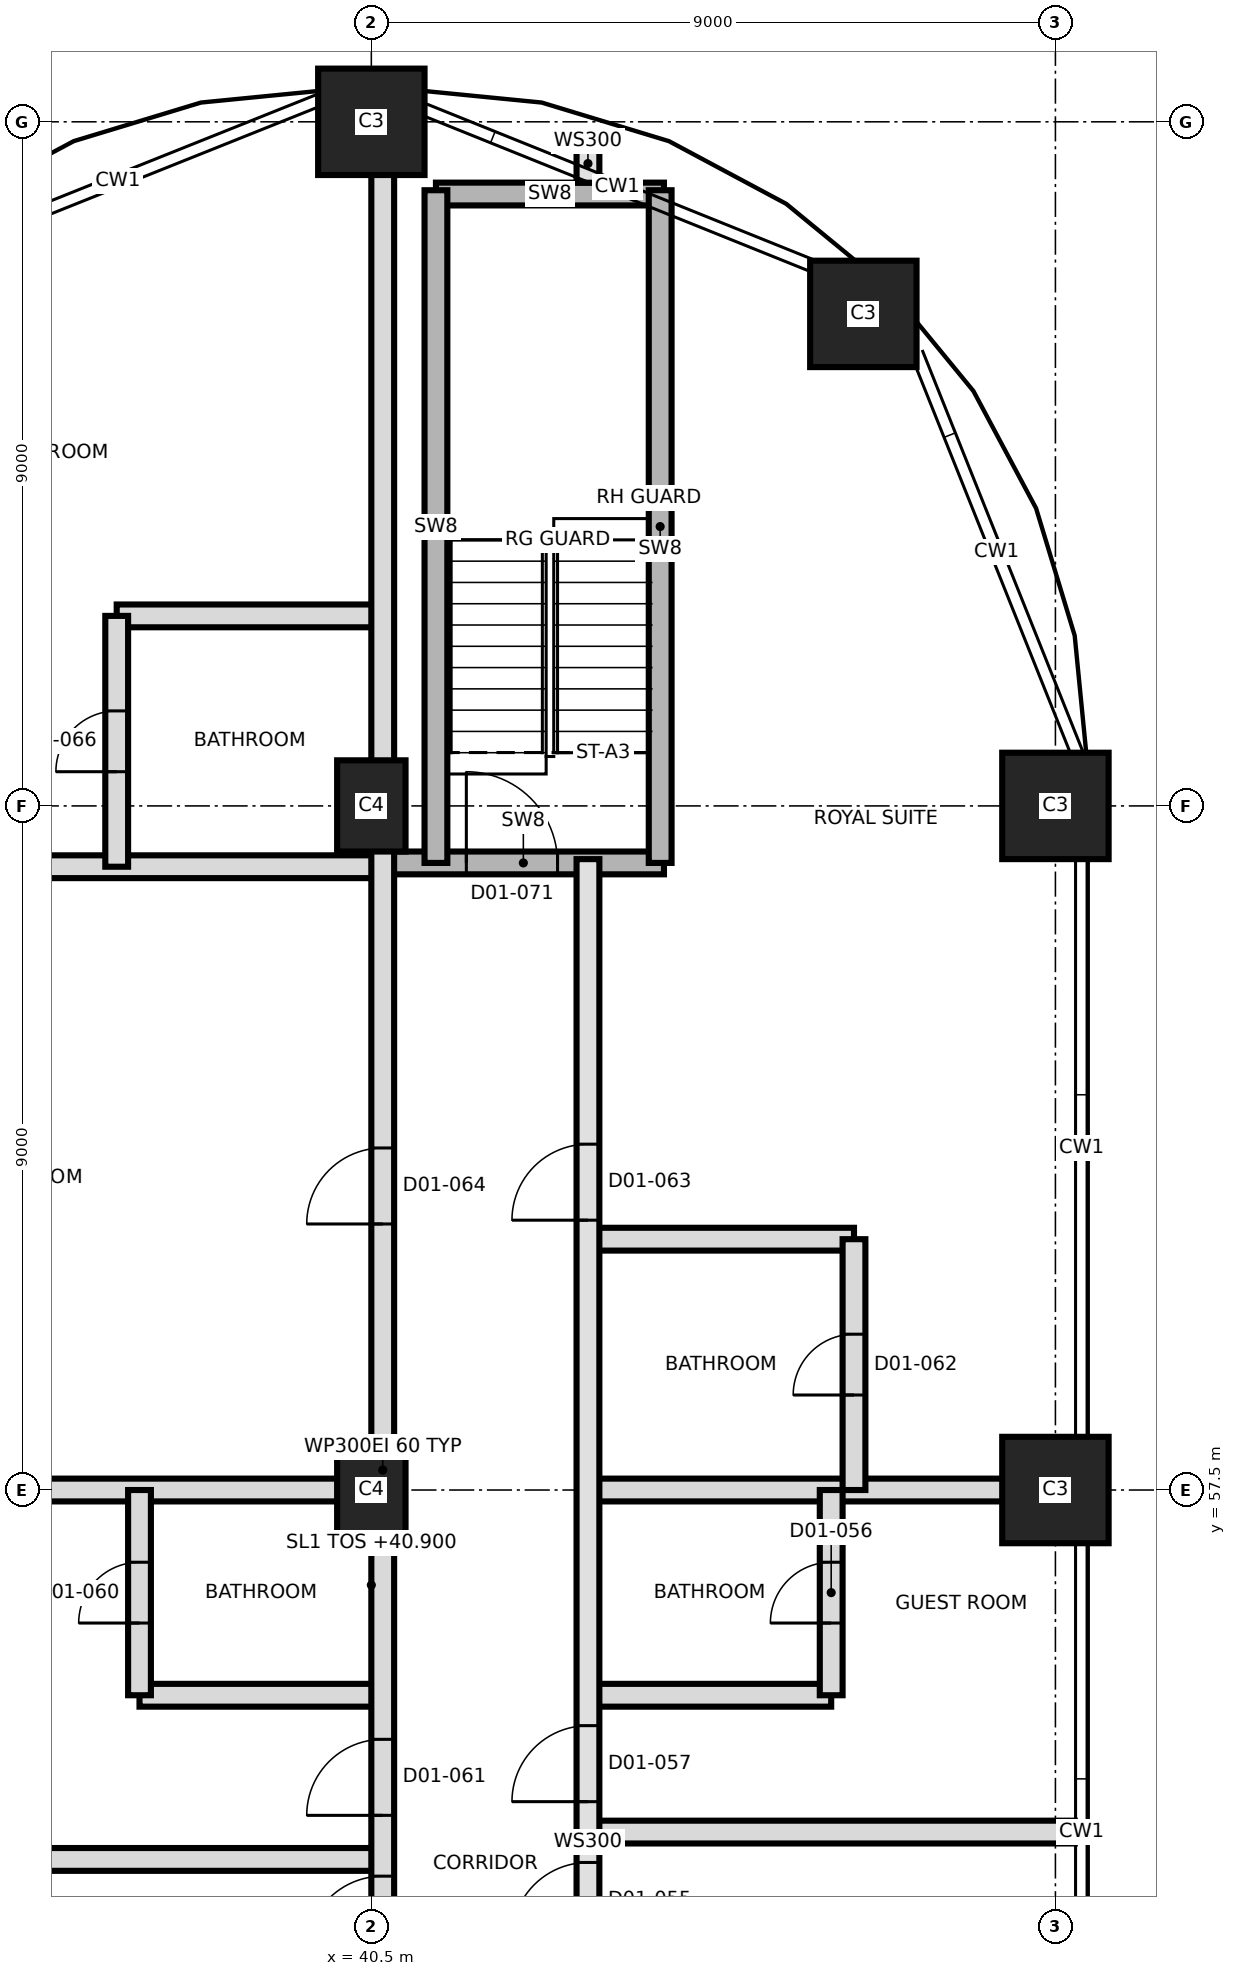
"""IFC4 building model, lengths in metres.
Left out: names, types, materials, properties, quantities, classifications, styles, units other than length and angle.
Written with IfcOpenShell. Run it as: python <this file> out.ifc"""

import sys

from ifc_helpers import new_model, si_unit, direction, frame, frame_2d, origin, origin_2d, place, context, subcontext, project, spatial, rectangle, extrude, element, fill, save


model = new_model("IFC4")
c1 = context("Model", 3, precision=1e-05, world=origin(), true_north=direction((0.0, 1.0)))
c2 = subcontext(c1, "Body", "Model", "MODEL_VIEW")
j1 = project(units=[si_unit("LENGTHUNIT", "METRE"), si_unit("PLANEANGLEUNIT", "RADIAN")], contexts=[c1])
p1 = place(None, origin())
s1 = spatial("IfcSite", under=j1, at=p1, CompositionType="ELEMENT")
p2 = place(p1, origin())
s2 = spatial("IfcBuilding", under=s1, at=p2, CompositionType="ELEMENT")
p3 = place(p2, frame((0.0, 0.0, 40.9)))
s3 = spatial("IfcBuildingStorey", under=s2, at=p3, CompositionType="ELEMENT", Elevation=40.9)
p4 = place(p3, frame((40.5, 57.5, 0.0), z_axis=(0.0, 0.0, 1.0), x_axis=(0.0, 1.0, 0.0)))
e1 = element("IfcColumn", 1, at=p4, inside=s3, PredefinedType="COLUMN", context=c2, shape_type="SweptSolid", body=[
    extrude(rectangle(XDim=1.2, YDim=0.9, at=origin_2d()), origin(), (0.0, 0.0, 1.0), 3.7),
])
p5 = place(p3, frame((49.5, 57.5, 0.0), z_axis=(0.0, 0.0, 1.0), x_axis=(1.0, 0.0, 0.0)))
e2 = element("IfcColumn", 2, at=p5, inside=s3, PredefinedType="COLUMN", context=c2, shape_type="SweptSolid", body=[
    extrude(rectangle(XDim=1.4, YDim=1.4, at=origin_2d()), origin(), (0.0, 0.0, 1.0), 3.7),
])
p6 = place(p3, frame((40.5, 66.5, 0.0), z_axis=(0.0, 0.0, 1.0), x_axis=(0.0, 1.0, 0.0)))
e3 = element("IfcColumn", 3, at=p6, inside=s3, PredefinedType="COLUMN", context=c2, shape_type="SweptSolid", body=[
    extrude(rectangle(XDim=1.2, YDim=0.9, at=origin_2d()), origin(), (0.0, 0.0, 1.0), 3.7),
])
for number, where, z_axis, x_axis in (
    (4, (49.5, 66.5, 0.0), (0.0, 0.0, 1.0), (1.0, 0.0, 0.0)),
    (5, (46.973, 72.973, 0.0), (0.0, 0.0, 1.0), (1.0, 0.0, 0.0)),
    (6, (40.5, 75.5, 0.0), (0.0, 0.0, 1.0), (1.0, 0.0, 0.0)),
):
    element("IfcColumn", number, at=place(p3, frame(where, z_axis=z_axis, x_axis=x_axis)), inside=s3, PredefinedType="COLUMN", context=c2, shape_type="SweptSolid", body=[
        extrude(rectangle(XDim=1.4, YDim=1.4, at=origin_2d()), origin(), (0.0, 0.0, 1.0), 3.7),
    ])
p7 = place(p3, frame((31.425, 52.64, 0.0), z_axis=(0.0, 0.0, 1.0), x_axis=(1.0, 0.0, 0.0)))
e7 = element("IfcWall", 7, at=p7, inside=s3, PredefinedType="PARTITIONING", context=c2, shape_type="SweptSolid", body=[
    extrude(rectangle(XDim=9.225, YDim=0.3, at=frame_2d((4.612, 0.0))), origin(), (0.0, 0.0, 1.0), 3.4),
])
p8 = place(p3, frame((43.35, 53.0, 0.0), z_axis=(0.0, 0.0, 1.0), x_axis=(1.0, 0.0, 0.0)))
e8 = element("IfcWall", 8, at=p8, inside=s3, PredefinedType="PARTITIONING", context=c2, shape_type="SweptSolid", body=[
    extrude(rectangle(XDim=6.405, YDim=0.3, at=frame_2d((3.202, 0.0))), origin(), (0.0, 0.0, 1.0), 3.4),
])
for number, where, z_axis, x_axis in (
    (9, (37.45, 54.8, 0.0), (0.0, 0.0, 1.0), (1.0, 0.0, 0.0)),
    (10, (43.35, 54.8, 0.0), (0.0, 0.0, 1.0), (1.0, 0.0, 0.0)),
):
    element("IfcWall", number, at=place(p3, frame(where, z_axis=z_axis, x_axis=x_axis)), inside=s3, PredefinedType="PARTITIONING", context=c2, shape_type="SweptSolid", body=[
        extrude(rectangle(XDim=3.2, YDim=0.3, at=frame_2d((1.6, 0.0))), origin(), (0.0, 0.0, 1.0), 3.4),
    ])
p9 = place(p3, frame((31.425, 57.5, 0.0), z_axis=(0.0, 0.0, 1.0), x_axis=(1.0, 0.0, 0.0)))
e11 = element("IfcWall", 11, at=p9, inside=s3, PredefinedType="PARTITIONING", context=c2, shape_type="SweptSolid", body=[
    extrude(rectangle(XDim=9.225, YDim=0.3, at=frame_2d((4.612, 0.0))), origin(), (0.0, 0.0, 1.0), 3.4),
])
p10 = place(p3, frame((43.35, 57.5, 0.0), z_axis=(0.0, 0.0, 1.0), x_axis=(1.0, 0.0, 0.0)))
e12 = element("IfcWall", 12, at=p10, inside=s3, PredefinedType="PARTITIONING", context=c2, shape_type="SweptSolid", body=[
    extrude(rectangle(XDim=6.225, YDim=0.3, at=frame_2d((3.112, 0.0))), origin(), (0.0, 0.0, 1.0), 3.4),
])
p11 = place(p3, frame((43.35, 60.8, 0.0), z_axis=(0.0, 0.0, 1.0), x_axis=(1.0, 0.0, 0.0)))
e13 = element("IfcWall", 13, at=p11, inside=s3, PredefinedType="PARTITIONING", context=c2, shape_type="SweptSolid", body=[
    extrude(rectangle(XDim=3.5, YDim=0.3, at=frame_2d((1.75, 0.0))), origin(), (0.0, 0.0, 1.0), 3.4),
])
p12 = place(p3, frame((31.425, 65.7, 0.0), z_axis=(0.0, 0.0, 1.0), x_axis=(1.0, 0.0, 0.0)))
e14 = element("IfcWall", 14, at=p12, inside=s3, PredefinedType="PARTITIONING", context=c2, shape_type="SweptSolid", body=[
    extrude(rectangle(XDim=9.225, YDim=0.3, at=frame_2d((4.612, 0.0))), origin(), (0.0, 0.0, 1.0), 3.4),
])
p13 = place(p12, frame((3.575, 0.0, 0.0)))
e15 = element("IfcOpeningElement", 15, at=p13, cuts=e14, PredefinedType="OPENING", context=c2, shape_type="SweptSolid", body=[
    extrude(rectangle(XDim=1.0, YDim=2.1, at=frame_2d((0.5, 1.05))), frame((0.0, 0.16, 0.0), z_axis=(0.0, -1.0, 0.0), x_axis=(1.0, 0.0, 0.0)), (0.0, 0.0, 1.0), 0.32),
])
p14 = place(p3, frame((40.65, 65.75, 0.0), z_axis=(0.0, 0.0, 1.0), x_axis=(1.0, 0.0, 0.0)))
e16 = element("IfcWall", 16, at=p14, inside=s3, PredefinedType="SHEAR", context=c2, shape_type="SweptSolid", body=[
    extrude(rectangle(XDim=3.7, YDim=0.3, at=frame_2d((1.85, 0.0))), origin(), (0.0, 0.0, 1.0), 3.4),
])
p15 = place(p14, frame((1.1, 0.0, 0.0)))
e17 = element("IfcOpeningElement", 17, at=p15, cuts=e16, PredefinedType="OPENING", context=c2, shape_type="SweptSolid", body=[
    extrude(rectangle(XDim=1.2, YDim=2.1, at=frame_2d((0.6, 1.05))), frame((0.0, 0.16, 0.0), z_axis=(0.0, -1.0, 0.0), x_axis=(1.0, 0.0, 0.0)), (0.0, 0.0, 1.0), 0.32),
])
p16 = place(p3, frame((37.15, 69.0, 0.0), z_axis=(0.0, 0.0, 1.0), x_axis=(1.0, 0.0, 0.0)))
e18 = element("IfcWall", 18, at=p16, inside=s3, PredefinedType="PARTITIONING", context=c2, shape_type="SweptSolid", body=[
    extrude(rectangle(XDim=3.5, YDim=0.3, at=frame_2d((1.75, 0.0))), origin(), (0.0, 0.0, 1.0), 3.4),
])
p17 = place(p3, frame((41.35, 74.55, 0.0), z_axis=(0.0, 0.0, 1.0), x_axis=(1.0, 0.0, 0.0)))
e19 = element("IfcWall", 19, at=p17, inside=s3, PredefinedType="SHEAR", context=c2, shape_type="SweptSolid", body=[
    extrude(rectangle(XDim=3.0, YDim=0.3, at=frame_2d((1.5, 0.0))), origin(), (0.0, 0.0, 1.0), 3.4),
])
p18 = place(p3, frame((37.15, 65.7, 0.0), z_axis=(0.0, 0.0, 1.0), x_axis=(0.0, 1.0, 0.0)))
e20 = element("IfcWall", 20, at=p18, inside=s3, PredefinedType="PARTITIONING", context=c2, shape_type="SweptSolid", body=[
    extrude(rectangle(XDim=3.3, YDim=0.3, at=frame_2d((1.65, 0.0))), origin(), (0.0, 0.0, 1.0), 3.4),
])
p19 = place(p18, frame((1.25, 0.0, 0.0)))
e21 = element("IfcOpeningElement", 21, at=p19, cuts=e20, PredefinedType="OPENING", context=c2, shape_type="SweptSolid", body=[
    extrude(rectangle(XDim=0.8, YDim=2.1, at=frame_2d((0.4, 1.05))), frame((0.0, 0.16, 0.0), z_axis=(0.0, -1.0, 0.0), x_axis=(1.0, 0.0, 0.0)), (0.0, 0.0, 1.0), 0.32),
])
p20 = place(p3, frame((37.45, 54.8, 0.0), z_axis=(0.0, 0.0, 1.0), x_axis=(0.0, 1.0, 0.0)))
e22 = element("IfcWall", 22, at=p20, inside=s3, PredefinedType="PARTITIONING", context=c2, shape_type="SweptSolid", body=[
    extrude(rectangle(XDim=2.7, YDim=0.3, at=frame_2d((1.35, 0.0))), origin(), (0.0, 0.0, 1.0), 3.4),
])
p21 = place(p20, frame((0.95, 0.0, 0.0)))
e23 = element("IfcOpeningElement", 23, at=p21, cuts=e22, PredefinedType="OPENING", context=c2, shape_type="SweptSolid", body=[
    extrude(rectangle(XDim=0.8, YDim=2.1, at=frame_2d((0.4, 1.05))), frame((0.0, 0.16, 0.0), z_axis=(0.0, -1.0, 0.0), x_axis=(1.0, 0.0, 0.0)), (0.0, 0.0, 1.0), 0.32),
])
p22 = place(p3, frame((40.65, 39.95, 0.0), z_axis=(0.0, 0.0, 1.0), x_axis=(0.0, 1.0, 0.0)))
e24 = element("IfcWall", 24, at=p22, inside=s3, PredefinedType="PARTITIONING", context=c2, shape_type="SweptSolid", body=[
    extrude(rectangle(XDim=35.625, YDim=0.3, at=frame_2d((17.812, 0.0))), origin(), (0.0, 0.0, 1.0), 3.4),
])
p23 = place(p22, frame((2.83, 0.0, 0.0)))
e25 = element("IfcOpeningElement", 25, at=p23, cuts=e24, PredefinedType="OPENING", context=c2, shape_type="SweptSolid", body=[
    extrude(rectangle(XDim=1.0, YDim=2.1, at=frame_2d((0.5, 1.05))), frame((0.0, 0.16, 0.0), z_axis=(0.0, -1.0, 0.0), x_axis=(1.0, 0.0, 0.0)), (0.0, 0.0, 1.0), 0.32),
])
p24 = place(p22, frame((4.63, 0.0, 0.0)))
e26 = element("IfcOpeningElement", 26, at=p24, cuts=e24, PredefinedType="OPENING", context=c2, shape_type="SweptSolid", body=[
    extrude(rectangle(XDim=1.0, YDim=2.1, at=frame_2d((0.5, 1.05))), frame((0.0, 0.16, 0.0), z_axis=(0.0, -1.0, 0.0), x_axis=(1.0, 0.0, 0.0)), (0.0, 0.0, 1.0), 0.32),
])
p25 = place(p22, frame((11.47, 0.0, 0.0)))
e27 = element("IfcOpeningElement", 27, at=p25, cuts=e24, PredefinedType="OPENING", context=c2, shape_type="SweptSolid", body=[
    extrude(rectangle(XDim=1.0, YDim=2.1, at=frame_2d((0.5, 1.05))), frame((0.0, 0.16, 0.0), z_axis=(0.0, -1.0, 0.0), x_axis=(1.0, 0.0, 0.0)), (0.0, 0.0, 1.0), 0.32),
])
p26 = place(p22, frame((13.27, 0.0, 0.0)))
e28 = element("IfcOpeningElement", 28, at=p26, cuts=e24, PredefinedType="OPENING", context=c2, shape_type="SweptSolid", body=[
    extrude(rectangle(XDim=1.0, YDim=2.1, at=frame_2d((0.5, 1.05))), frame((0.0, 0.16, 0.0), z_axis=(0.0, -1.0, 0.0), x_axis=(1.0, 0.0, 0.0)), (0.0, 0.0, 1.0), 0.32),
])
p27 = place(p22, frame((21.05, 0.0, 0.0)))
e29 = element("IfcOpeningElement", 29, at=p27, cuts=e24, PredefinedType="OPENING", context=c2, shape_type="SweptSolid", body=[
    extrude(rectangle(XDim=1.0, YDim=2.4, at=frame_2d((0.5, 1.2))), frame((0.0, 0.16, 0.0), z_axis=(0.0, -1.0, 0.0), x_axis=(1.0, 0.0, 0.0)), (0.0, 0.0, 1.0), 0.32),
])
p28 = place(p3, frame((41.35, 65.75, 0.0), z_axis=(0.0, 0.0, 1.0), x_axis=(0.0, 1.0, 0.0)))
e30 = element("IfcWall", 30, at=p28, inside=s3, PredefinedType="SHEAR", context=c2, shape_type="SweptSolid", body=[
    extrude(rectangle(XDim=8.85, YDim=0.3, at=frame_2d((4.425, 0.0))), origin(), (0.0, 0.0, 1.0), 3.4),
])
p29 = place(p3, frame((43.35, 39.95, 0.0), z_axis=(0.0, 0.0, 1.0), x_axis=(0.0, 1.0, 0.0)))
e31 = element("IfcWall", 31, at=p29, inside=s3, PredefinedType="SOLIDWALL", context=c2, shape_type="SweptSolid", body=[
    extrude(rectangle(XDim=25.85, YDim=0.3, at=frame_2d((12.925, 0.0))), origin(), (0.0, 0.0, 1.0), 3.4),
])
p30 = place(p29, frame((2.47, 0.0, 0.0)))
e32 = element("IfcOpeningElement", 32, at=p30, cuts=e31, PredefinedType="OPENING", context=c2, shape_type="SweptSolid", body=[
    extrude(rectangle(XDim=1.0, YDim=2.1, at=frame_2d((0.5, 1.05))), frame((0.0, 0.16, 0.0), z_axis=(0.0, -1.0, 0.0), x_axis=(1.0, 0.0, 0.0)), (0.0, 0.0, 1.0), 0.32),
])
p31 = place(p29, frame((4.27, 0.0, 0.0)))
e33 = element("IfcOpeningElement", 33, at=p31, cuts=e31, PredefinedType="OPENING", context=c2, shape_type="SweptSolid", body=[
    extrude(rectangle(XDim=1.0, YDim=2.1, at=frame_2d((0.5, 1.05))), frame((0.0, 0.16, 0.0), z_axis=(0.0, -1.0, 0.0), x_axis=(1.0, 0.0, 0.0)), (0.0, 0.0, 1.0), 0.32),
])
p32 = place(p29, frame((11.65, 0.0, 0.0)))
e34 = element("IfcOpeningElement", 34, at=p32, cuts=e31, PredefinedType="OPENING", context=c2, shape_type="SweptSolid", body=[
    extrude(rectangle(XDim=1.0, YDim=2.1, at=frame_2d((0.5, 1.05))), frame((0.0, 0.16, 0.0), z_axis=(0.0, -1.0, 0.0), x_axis=(1.0, 0.0, 0.0)), (0.0, 0.0, 1.0), 0.32),
])
p33 = place(p29, frame((13.45, 0.0, 0.0)))
e35 = element("IfcOpeningElement", 35, at=p33, cuts=e31, PredefinedType="OPENING", context=c2, shape_type="SweptSolid", body=[
    extrude(rectangle(XDim=1.0, YDim=2.1, at=frame_2d((0.5, 1.05))), frame((0.0, 0.16, 0.0), z_axis=(0.0, -1.0, 0.0), x_axis=(1.0, 0.0, 0.0)), (0.0, 0.0, 1.0), 0.32),
])
p34 = place(p29, frame((21.1, 0.0, 0.0)))
e36 = element("IfcOpeningElement", 36, at=p34, cuts=e31, PredefinedType="OPENING", context=c2, shape_type="SweptSolid", body=[
    extrude(rectangle(XDim=1.0, YDim=2.4, at=frame_2d((0.5, 1.2))), frame((0.0, 0.16, 0.0), z_axis=(0.0, -1.0, 0.0), x_axis=(1.0, 0.0, 0.0)), (0.0, 0.0, 1.0), 0.32),
])
p35 = place(p3, frame((43.35, 74.699, 0.0), z_axis=(0.0, 0.0, 1.0), x_axis=(0.0, 1.0, 0.0)))
e37 = element("IfcWall", 37, at=p35, inside=s3, PredefinedType="SOLIDWALL", context=c2, shape_type="SweptSolid", body=[
    extrude(rectangle(XDim=0.504, YDim=0.3, at=frame_2d((0.252, 0.0))), origin(), (0.0, 0.0, 1.0), 3.4),
])
p36 = place(p3, frame((44.3, 65.75, 0.0), z_axis=(0.0, 0.0, 1.0), x_axis=(0.0, 1.0, 0.0)))
e38 = element("IfcWall", 38, at=p36, inside=s3, PredefinedType="SHEAR", context=c2, shape_type="SweptSolid", body=[
    extrude(rectangle(XDim=8.85, YDim=0.3, at=frame_2d((4.425, 0.0))), origin(), (0.0, 0.0, 1.0), 3.4),
])
p37 = place(p3, frame((46.55, 54.8, 0.0), z_axis=(0.0, 0.0, 1.0), x_axis=(0.0, 1.0, 0.0)))
e39 = element("IfcWall", 39, at=p37, inside=s3, PredefinedType="PARTITIONING", context=c2, shape_type="SweptSolid", body=[
    extrude(rectangle(XDim=2.7, YDim=0.3, at=frame_2d((1.35, 0.0))), origin(), (0.0, 0.0, 1.0), 3.4),
])
p38 = place(p37, frame((0.95, 0.0, 0.0)))
e40 = element("IfcOpeningElement", 40, at=p38, cuts=e39, PredefinedType="OPENING", context=c2, shape_type="SweptSolid", body=[
    extrude(rectangle(XDim=0.8, YDim=2.1, at=frame_2d((0.4, 1.05))), frame((0.0, 0.16, 0.0), z_axis=(0.0, -1.0, 0.0), x_axis=(1.0, 0.0, 0.0)), (0.0, 0.0, 1.0), 0.32),
])
p39 = place(p3, frame((46.85, 57.5, 0.0), z_axis=(0.0, 0.0, 1.0), x_axis=(0.0, 1.0, 0.0)))
e41 = element("IfcWall", 41, at=p39, inside=s3, PredefinedType="PARTITIONING", context=c2, shape_type="SweptSolid", body=[
    extrude(rectangle(XDim=3.3, YDim=0.3, at=frame_2d((1.65, 0.0))), origin(), (0.0, 0.0, 1.0), 3.4),
])
p40 = place(p39, frame((1.25, 0.0, 0.0)))
e42 = element("IfcOpeningElement", 42, at=p40, cuts=e41, PredefinedType="OPENING", context=c2, shape_type="SweptSolid", body=[
    extrude(rectangle(XDim=0.8, YDim=2.1, at=frame_2d((0.4, 1.05))), frame((0.0, 0.16, 0.0), z_axis=(0.0, -1.0, 0.0), x_axis=(1.0, 0.0, 0.0)), (0.0, 0.0, 1.0), 0.32),
])
p41 = place(p32, origin())
e43 = element("IfcDoor", 43, at=p41, inside=s3, OperationType="SINGLE_SWING_LEFT", PredefinedType="DOOR", context=c2, shape_type="SweptSolid", body=[
    extrude(rectangle(XDim=1.0, YDim=2.1, at=frame_2d((0.5, 1.05))), frame((0.0, 0.025, 0.0), z_axis=(0.0, -1.0, 0.0), x_axis=(1.0, 0.0, 0.0)), (0.0, 0.0, 1.0), 0.05),
])
fill(e34, e43)
p42 = place(p38, origin())
e44 = element("IfcDoor", 44, at=p42, inside=s3, OperationType="SINGLE_SWING_LEFT", PredefinedType="DOOR", context=c2, shape_type="SweptSolid", body=[
    extrude(rectangle(XDim=0.8, YDim=2.1, at=frame_2d((0.4, 1.05))), frame((0.0, 0.025, 0.0), z_axis=(0.0, -1.0, 0.0), x_axis=(1.0, 0.0, 0.0)), (0.0, 0.0, 1.0), 0.05),
])
fill(e40, e44)
p43 = place(p33, origin())
e45 = element("IfcDoor", 45, at=p43, inside=s3, OperationType="SINGLE_SWING_RIGHT", PredefinedType="DOOR", context=c2, shape_type="SweptSolid", body=[
    extrude(rectangle(XDim=1.0, YDim=2.1, at=frame_2d((0.5, 1.05))), frame((0.0, 0.025, 0.0), z_axis=(0.0, -1.0, 0.0), x_axis=(1.0, 0.0, 0.0)), (0.0, 0.0, 1.0), 0.05),
])
fill(e35, e45)
p44 = place(p25, origin())
e46 = element("IfcDoor", 46, at=p44, inside=s3, OperationType="SINGLE_SWING_LEFT", PredefinedType="DOOR", context=c2, shape_type="SweptSolid", body=[
    extrude(rectangle(XDim=1.0, YDim=2.1, at=frame_2d((0.5, 1.05))), frame((0.0, 0.025, 0.0), z_axis=(0.0, -1.0, 0.0), x_axis=(1.0, 0.0, 0.0)), (0.0, 0.0, 1.0), 0.05),
])
fill(e27, e46)
p45 = place(p21, origin())
e47 = element("IfcDoor", 47, at=p45, inside=s3, OperationType="SINGLE_SWING_LEFT", PredefinedType="DOOR", context=c2, shape_type="SweptSolid", body=[
    extrude(rectangle(XDim=0.8, YDim=2.1, at=frame_2d((0.4, 1.05))), frame((0.0, 0.025, 0.0), z_axis=(0.0, -1.0, 0.0), x_axis=(1.0, 0.0, 0.0)), (0.0, 0.0, 1.0), 0.05),
])
fill(e23, e47)
p46 = place(p26, origin())
e48 = element("IfcDoor", 48, at=p46, inside=s3, OperationType="SINGLE_SWING_LEFT", PredefinedType="DOOR", context=c2, shape_type="SweptSolid", body=[
    extrude(rectangle(XDim=1.0, YDim=2.1, at=frame_2d((0.5, 1.05))), frame((0.0, 0.025, 0.0), z_axis=(0.0, -1.0, 0.0), x_axis=(1.0, 0.0, 0.0)), (0.0, 0.0, 1.0), 0.05),
])
fill(e28, e48)
p47 = place(p40, origin())
e49 = element("IfcDoor", 49, at=p47, inside=s3, OperationType="SINGLE_SWING_LEFT", PredefinedType="DOOR", context=c2, shape_type="SweptSolid", body=[
    extrude(rectangle(XDim=0.8, YDim=2.1, at=frame_2d((0.4, 1.05))), frame((0.0, 0.025, 0.0), z_axis=(0.0, -1.0, 0.0), x_axis=(1.0, 0.0, 0.0)), (0.0, 0.0, 1.0), 0.05),
])
fill(e42, e49)
p48 = place(p34, origin())
e50 = element("IfcDoor", 50, at=p48, inside=s3, OperationType="SINGLE_SWING_RIGHT", PredefinedType="DOOR", context=c2, shape_type="SweptSolid", body=[
    extrude(rectangle(XDim=1.0, YDim=2.4, at=frame_2d((0.5, 1.2))), frame((0.0, 0.025, 0.0), z_axis=(0.0, -1.0, 0.0), x_axis=(1.0, 0.0, 0.0)), (0.0, 0.0, 1.0), 0.05),
])
fill(e36, e50)
p49 = place(p27, origin())
e51 = element("IfcDoor", 51, at=p49, inside=s3, OperationType="SINGLE_SWING_LEFT", PredefinedType="DOOR", context=c2, shape_type="SweptSolid", body=[
    extrude(rectangle(XDim=1.0, YDim=2.4, at=frame_2d((0.5, 1.2))), frame((0.0, 0.025, 0.0), z_axis=(0.0, -1.0, 0.0), x_axis=(1.0, 0.0, 0.0)), (0.0, 0.0, 1.0), 0.05),
])
fill(e29, e51)
p50 = place(p19, origin())
e52 = element("IfcDoor", 52, at=p50, inside=s3, OperationType="SINGLE_SWING_LEFT", PredefinedType="DOOR", context=c2, shape_type="SweptSolid", body=[
    extrude(rectangle(XDim=0.8, YDim=2.1, at=frame_2d((0.4, 1.05))), frame((0.0, 0.025, 0.0), z_axis=(0.0, -1.0, 0.0), x_axis=(1.0, 0.0, 0.0)), (0.0, 0.0, 1.0), 0.05),
])
fill(e21, e52)
p51 = place(p15, origin())
e53 = element("IfcDoor", 53, at=p51, inside=s3, OperationType="SINGLE_SWING_RIGHT", PredefinedType="DOOR", context=c2, shape_type="SweptSolid", body=[
    extrude(rectangle(XDim=1.2, YDim=2.1, at=frame_2d((0.6, 1.05))), frame((0.0, 0.025, 0.0), z_axis=(0.0, -1.0, 0.0), x_axis=(1.0, 0.0, 0.0)), (0.0, 0.0, 1.0), 0.05),
])
fill(e17, e53)
save(model, sys.argv[1])
